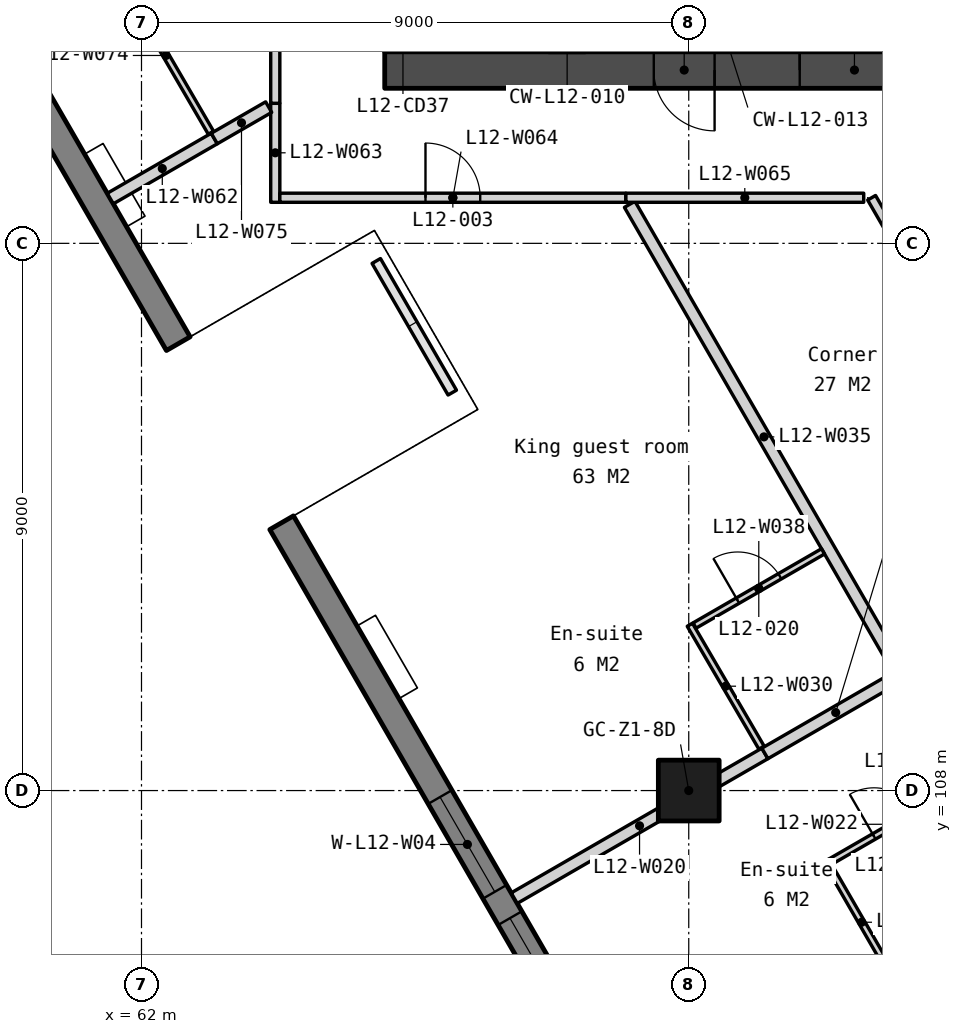
"""IFC4 building model, lengths in metres.
Left out: names, types, materials, properties, quantities, classifications, styles, units other than length and angle.
Written with IfcOpenShell. Run it as: python <this file> out.ifc"""

import sys

from ifc_helpers import new_model, si_unit, direction, frame, frame_2d, origin, origin_2d, place, context, subcontext, project, spatial, polyline, rectangle, outline, extrude, element, fill, save


model = new_model("IFC4")
c1 = context("Model", 3, precision=1e-05, world=origin(), true_north=direction((0.0, 1.0)))
c2 = subcontext(c1, "Body", "Model", "MODEL_VIEW")
j1 = project(units=[si_unit("LENGTHUNIT", "METRE"), si_unit("PLANEANGLEUNIT", "RADIAN")], contexts=[c1])
p1 = place(None, origin())
s1 = spatial("IfcSite", under=j1, at=p1, CompositionType="ELEMENT")
p2 = place(p1, origin())
s2 = spatial("IfcBuilding", under=s1, at=p2, CompositionType="ELEMENT")
p3 = place(p2, frame((0.0, 0.0, 56.0)))
s3 = spatial("IfcBuildingStorey", under=s2, at=p3, CompositionType="ELEMENT", Elevation=56.0)
p4 = place(p3, frame((71.0, 108.0, 0.0), z_axis=(0.0, 0.0, 1.0), x_axis=(1.0, 0.0, 0.0)))
e1 = element("IfcColumn", 1, at=p4, inside=s3, PredefinedType="COLUMN", context=c2, shape_type="SweptSolid", body=[
    extrude(rectangle(XDim=1.0, YDim=1.0, at=origin_2d()), origin(), (0.0, 0.0, 1.0), 3.5),
])
p5 = place(p3, frame((66.0, 119.85, 0.0), z_axis=(0.0, 0.0, 1.0), x_axis=(1.0, 0.0, 0.0)))
e2 = element("IfcWall", 2, at=p5, inside=s3, PredefinedType="SOLIDWALL", context=c2, shape_type="SweptSolid", body=[
    extrude(rectangle(XDim=28.0, YDim=0.6, at=frame_2d((14.0, 0.0))), origin(), (0.0, 0.0, 1.0), 3.35),
])
p6 = place(p5, frame((6.825, 0.0, 0.0)))
e3 = element("IfcOpeningElement", 3, at=p6, cuts=e2, PredefinedType="OPENING", context=c2, shape_type="SweptSolid", body=[
    extrude(rectangle(XDim=1.8, YDim=2.1, at=frame_2d((0.9, 1.05))), frame((0.0, 0.31, 0.0), z_axis=(0.0, -1.0, 0.0), x_axis=(1.0, 0.0, 0.0)), (0.0, 0.0, 1.0), 0.62),
])
p7 = place(p5, frame((15.85, 0.0, 0.0)))
e4 = element("IfcOpeningElement", 4, at=p7, cuts=e2, PredefinedType="OPENING", context=c2, shape_type="SweptSolid", body=[
    extrude(rectangle(XDim=1.5, YDim=2.1, at=frame_2d((0.75, 1.05))), frame((0.0, 0.31, 0.0), z_axis=(0.0, -1.0, 0.0), x_axis=(1.0, 0.0, 0.0)), (0.0, 0.0, 1.0), 0.62),
])
p8 = place(p5, frame((19.375, 0.0, 0.0)))
e5 = element("IfcOpeningElement", 5, at=p8, cuts=e2, PredefinedType="OPENING", context=c2, shape_type="SweptSolid", body=[
    extrude(rectangle(XDim=1.8, YDim=2.1, at=frame_2d((0.9, 1.05))), frame((0.0, 0.31, 0.0), z_axis=(0.0, -1.0, 0.0), x_axis=(1.0, 0.0, 0.0)), (0.0, 0.0, 1.0), 0.62),
])
p9 = place(p5, frame((4.425, 0.0, 0.0)))
e6 = element("IfcOpeningElement", 6, at=p9, cuts=e2, PredefinedType="OPENING", context=c2, shape_type="SweptSolid", body=[
    extrude(rectangle(XDim=1.0, YDim=2.1, at=frame_2d((0.5, 1.05))), frame((0.0, 0.31, 0.0), z_axis=(0.0, -1.0, 0.0), x_axis=(1.0, 0.0, 0.0)), (0.0, 0.0, 1.0), 0.62),
])
p10 = place(p5, frame((9.783, 0.0, 0.0)))
e7 = element("IfcOpeningElement", 7, at=p10, cuts=e2, PredefinedType="OPENING", context=c2, shape_type="SweptSolid", body=[
    extrude(rectangle(XDim=1.0, YDim=2.1, at=frame_2d((0.5, 1.05))), frame((0.0, 0.31, 0.0), z_axis=(0.0, -1.0, 0.0), x_axis=(1.0, 0.0, 0.0)), (0.0, 0.0, 1.0), 0.62),
])
p11 = place(p5, frame((11.525, 0.0, 0.0)))
e8 = element("IfcOpeningElement", 8, at=p11, cuts=e2, PredefinedType="OPENING", context=c2, shape_type="SweptSolid", body=[
    extrude(rectangle(XDim=1.0, YDim=2.1, at=frame_2d((0.5, 1.05))), frame((0.0, 0.31, 0.0), z_axis=(0.0, -1.0, 0.0), x_axis=(1.0, 0.0, 0.0)), (0.0, 0.0, 1.0), 0.62),
])
p12 = place(p5, frame((13.658, 0.0, 0.0)))
e9 = element("IfcOpeningElement", 9, at=p12, cuts=e2, PredefinedType="OPENING", context=c2, shape_type="SweptSolid", body=[
    extrude(rectangle(XDim=1.0, YDim=2.1, at=frame_2d((0.5, 1.05))), frame((0.0, 0.31, 0.0), z_axis=(0.0, -1.0, 0.0), x_axis=(1.0, 0.0, 0.0)), (0.0, 0.0, 1.0), 0.62),
])
p13 = place(p5, frame((21.725, 0.0, 0.0)))
e10 = element("IfcOpeningElement", 10, at=p13, cuts=e2, PredefinedType="OPENING", context=c2, shape_type="SweptSolid", body=[
    extrude(rectangle(XDim=1.0, YDim=2.1, at=frame_2d((0.5, 1.05))), frame((0.0, 0.31, 0.0), z_axis=(0.0, -1.0, 0.0), x_axis=(1.0, 0.0, 0.0)), (0.0, 0.0, 1.0), 0.62),
])
p14 = place(p5, frame((23.425, 0.0, 0.0)))
e11 = element("IfcOpeningElement", 11, at=p14, cuts=e2, PredefinedType="OPENING", context=c2, shape_type="SweptSolid", body=[
    extrude(rectangle(XDim=1.0, YDim=2.1, at=frame_2d((0.5, 1.05))), frame((0.0, 0.31, 0.0), z_axis=(0.0, -1.0, 0.0), x_axis=(1.0, 0.0, 0.0)), (0.0, 0.0, 1.0), 0.62),
])
p15 = place(p3, frame((54.495, 129.397, -0.15), z_axis=(0.0, 0.0, 1.0), x_axis=(0.499995201193, -0.866028174359, 0.0)))
e12 = element("IfcWall", 12, at=p15, inside=s3, PredefinedType="SOLIDWALL", context=c2, shape_type="SweptSolid", body=[
    extrude(outline(polyline([(0.0, 0.0), (0.0, 3.5), (16.22, 3.5), (16.22, 0.0), (0.0, 0.0)])), frame((0.0, 0.225, 0.0), z_axis=(0.0, -1.0, 0.0), x_axis=(1.0, 0.0, 0.0)), (0.0, 0.0, 1.0), 0.45),
])
p16 = place(p15, frame((0.786, 0.0, 1.05)))
e13 = element("IfcOpeningElement", 13, at=p16, cuts=e12, PredefinedType="OPENING", context=c2, shape_type="SweptSolid", body=[
    extrude(rectangle(XDim=1.2, YDim=1.5, at=frame_2d((0.6, 0.75))), frame((0.0, 0.235, 0.0), z_axis=(0.0, -1.0, 0.0), x_axis=(1.0, 0.0, 0.0)), (0.0, 0.0, 1.0), 0.47),
])
p17 = place(p15, frame((6.91, 0.0, 1.05)))
e14 = element("IfcOpeningElement", 14, at=p17, cuts=e12, PredefinedType="OPENING", context=c2, shape_type="SweptSolid", body=[
    extrude(rectangle(XDim=1.8, YDim=1.5, at=frame_2d((0.9, 0.75))), frame((0.0, 0.235, 0.0), z_axis=(0.0, -1.0, 0.0), x_axis=(1.0, 0.0, 0.0)), (0.0, 0.0, 1.0), 0.47),
])
p18 = place(p15, frame((9.21, 0.0, 1.05)))
e15 = element("IfcOpeningElement", 15, at=p18, cuts=e12, PredefinedType="OPENING", context=c2, shape_type="SweptSolid", body=[
    extrude(rectangle(XDim=1.8, YDim=1.5, at=frame_2d((0.9, 0.75))), frame((0.0, 0.235, 0.0), z_axis=(0.0, -1.0, 0.0), x_axis=(1.0, 0.0, 0.0)), (0.0, 0.0, 1.0), 0.47),
])
p19 = place(p3, frame((64.305, 112.405, -0.15), z_axis=(0.0, 0.0, 1.0), x_axis=(0.499997464327, -0.866026867751, 0.0)))
e16 = element("IfcWall", 16, at=p19, inside=s3, PredefinedType="SOLIDWALL", context=c2, shape_type="SweptSolid", body=[
    extrude(outline(polyline([(25.18, 3.5), (25.18, 0.0), (0.0, 0.0), (0.0, 3.5), (25.18, 3.5)])), frame((0.0, 0.225, 0.0), z_axis=(0.0, -1.0, 0.0), x_axis=(1.0, 0.0, 0.0)), (0.0, 0.0, 1.0), 0.45),
])
p20 = place(p19, frame((5.21, 0.0, 1.05)))
e17 = element("IfcOpeningElement", 17, at=p20, cuts=e16, PredefinedType="OPENING", context=c2, shape_type="SweptSolid", body=[
    extrude(rectangle(XDim=1.8, YDim=1.5, at=frame_2d((0.9, 0.75))), frame((0.0, 0.235, 0.0), z_axis=(0.0, -1.0, 0.0), x_axis=(1.0, 0.0, 0.0)), (0.0, 0.0, 1.0), 0.47),
])
p21 = place(p19, frame((7.51, 0.0, 1.05)))
e18 = element("IfcOpeningElement", 18, at=p21, cuts=e16, PredefinedType="OPENING", context=c2, shape_type="SweptSolid", body=[
    extrude(rectangle(XDim=1.8, YDim=1.5, at=frame_2d((0.9, 0.75))), frame((0.0, 0.235, 0.0), z_axis=(0.0, -1.0, 0.0), x_axis=(1.0, 0.0, 0.0)), (0.0, 0.0, 1.0), 0.47),
])
p22 = place(p19, frame((14.17, 0.0, 1.05)))
e19 = element("IfcOpeningElement", 19, at=p22, cuts=e16, PredefinedType="OPENING", context=c2, shape_type="SweptSolid", body=[
    extrude(rectangle(XDim=1.8, YDim=1.5, at=frame_2d((0.9, 0.75))), frame((0.0, 0.235, 0.0), z_axis=(0.0, -1.0, 0.0), x_axis=(1.0, 0.0, 0.0)), (0.0, 0.0, 1.0), 0.47),
])
p23 = place(p19, frame((16.47, 0.0, 1.05)))
e20 = element("IfcOpeningElement", 20, at=p23, cuts=e16, PredefinedType="OPENING", context=c2, shape_type="SweptSolid", body=[
    extrude(rectangle(XDim=1.8, YDim=1.5, at=frame_2d((0.9, 0.75))), frame((0.0, 0.235, 0.0), z_axis=(0.0, -1.0, 0.0), x_axis=(1.0, 0.0, 0.0)), (0.0, 0.0, 1.0), 0.47),
])
p24 = place(p19, frame((23.194, 0.0, 1.05)))
e21 = element("IfcOpeningElement", 21, at=p24, cuts=e16, PredefinedType="OPENING", context=c2, shape_type="SweptSolid", body=[
    extrude(rectangle(XDim=1.2, YDim=1.5, at=frame_2d((0.6, 0.75))), frame((0.0, 0.235, 0.0), z_axis=(0.0, -1.0, 0.0), x_axis=(1.0, 0.0, 0.0)), (0.0, 0.0, 1.0), 0.47),
])
p25 = place(p2, frame((0.0, 0.0, 52.5)))
s4 = spatial("IfcBuildingStorey", under=s2, at=p25, CompositionType="ELEMENT", Elevation=52.5)
for number, where, z_axis, x_axis in (
    (22, (62.522, 115.042, 0.0), (0.0, 0.0, 1.0), (0.866, 0.5, 0.0)),
    (23, (63.998, 112.488, 0.0), (0.0, 0.0, 1.0), (0.866, 0.5, 0.0)),
):
    element("IfcWall", number, at=place(p25, frame(where, z_axis=z_axis, x_axis=x_axis)), inside=s4, PredefinedType="SOLIDWALL", context=c2, shape_type="SweptSolid", body=[
        extrude(rectangle(XDim=3.95, YDim=0.45, at=frame_2d((1.975, 0.0))), origin(), (0.0, 0.0, 1.0), 6.85),
    ])
p26 = place(p3, frame((73.258, 106.847, 0.0), z_axis=(0.0, 0.0, 1.0), x_axis=(0.499999433879, -0.866025730634, 0.0)))
e24 = element("IfcWall", 24, at=p26, inside=s3, PredefinedType="PARTITIONING", context=c2, shape_type="SweptSolid", body=[
    extrude(rectangle(XDim=2.34, YDim=0.1, at=frame_2d((1.17, 0.0))), origin(), (0.0, 0.0, 1.0), 3.35),
])
p27 = place(p3, frame((68.13, 106.23, 0.0), z_axis=(0.0, 0.0, 1.0), x_axis=(0.866037825118, 0.499978485002, 0.0)))
e25 = element("IfcWall", 25, at=p27, inside=s3, PredefinedType="PARTITIONING", context=c2, shape_type="SweptSolid", body=[
    extrude(rectangle(XDim=4.76, YDim=0.2, at=frame_2d((2.38, 0.0))), origin(), (0.0, 0.0, 1.0), 3.35),
])
p28 = place(p3, frame((73.327, 106.829, 0.0), z_axis=(0.0, 0.0, 1.0), x_axis=(0.866040446274, 0.499973944738, 0.0)))
e26 = element("IfcWall", 26, at=p28, inside=s3, PredefinedType="PARTITIONING", context=c2, shape_type="SweptSolid", body=[
    extrude(rectangle(XDim=2.465, YDim=0.1, at=frame_2d((1.232, 0.0))), origin(), (0.0, 0.0, 1.0), 3.35),
])
p29 = place(p28, frame((0.833, 0.0, 0.0)))
e27 = element("IfcOpeningElement", 27, at=p29, cuts=e26, PredefinedType="OPENING", context=c2, shape_type="SweptSolid", body=[
    extrude(rectangle(XDim=0.8, YDim=2.1, at=frame_2d((0.4, 1.05))), frame((0.0, 0.06, 0.0), z_axis=(0.0, -1.0, 0.0), x_axis=(1.0, 0.0, 0.0)), (0.0, 0.0, 1.0), 0.12),
])
p30 = place(p3, frame((71.018, 110.727, 0.0), z_axis=(0.0, 0.0, 1.0), x_axis=(0.503637463939, -0.863915102841, 0.0)))
e28 = element("IfcWall", 28, at=p30, inside=s3, PredefinedType="PARTITIONING", context=c2, shape_type="SweptSolid", body=[
    extrude(rectangle(XDim=2.34, YDim=0.1, at=frame_2d((1.17, 0.0))), origin(), (0.0, 0.0, 1.0), 3.35),
])
p31 = place(p3, frame((72.252, 108.61, 0.0), z_axis=(0.0, 0.0, 1.0), x_axis=(0.865989100438, 0.500062873969, 0.0)))
e29 = element("IfcWall", 29, at=p31, inside=s3, PredefinedType="PARTITIONING", context=c2, shape_type="SweptSolid", body=[
    extrude(rectangle(XDim=2.69, YDim=0.2, at=frame_2d((1.345, 0.0))), origin(), (0.0, 0.0, 1.0), 3.35),
])
p32 = place(p3, frame((70.029, 117.642, 0.0), z_axis=(0.0, 0.0, 1.0), x_axis=(0.499997595687, -0.866026791911, 0.0)))
e30 = element("IfcWall", 30, at=p32, inside=s3, PredefinedType="PARTITIONING", context=c2, shape_type="SweptSolid", body=[
    extrude(rectangle(XDim=8.833, YDim=0.2, at=frame_2d((4.417, 0.0))), origin(), (0.0, 0.0, 1.0), 3.35),
])
p33 = place(p3, frame((71.095, 110.714, 0.0), z_axis=(0.0, 0.0, 1.0), x_axis=(0.866048967903, 0.499959183527, 0.0)))
e31 = element("IfcWall", 31, at=p33, inside=s3, PredefinedType="PARTITIONING", context=c2, shape_type="SweptSolid", body=[
    extrude(rectangle(XDim=2.44, YDim=0.1, at=frame_2d((1.22, 0.0))), origin(), (0.0, 0.0, 1.0), 3.35),
])
p34 = place(p33, frame((0.82, 0.0, 0.0)))
e32 = element("IfcOpeningElement", 32, at=p34, cuts=e31, PredefinedType="OPENING", context=c2, shape_type="SweptSolid", body=[
    extrude(rectangle(XDim=0.8, YDim=2.1, at=frame_2d((0.4, 1.05))), frame((0.0, 0.06, 0.0), z_axis=(0.0, -1.0, 0.0), x_axis=(1.0, 0.0, 0.0)), (0.0, 0.0, 1.0), 0.12),
])
p35 = place(p3, frame((74.007, 117.75, 0.0), z_axis=(0.0, 0.0, 1.0), x_axis=(0.500026110575, -0.866010328312, 0.0)))
e33 = element("IfcWall", 33, at=p35, inside=s3, PredefinedType="PARTITIONING", context=c2, shape_type="SweptSolid", body=[
    extrude(rectangle(XDim=7.052, YDim=0.15, at=frame_2d((3.526, 0.0))), origin(), (0.0, 0.0, 1.0), 3.35),
])
p36 = place(p35, frame((3.026, 0.0, 0.0)))
e34 = element("IfcOpeningElement", 34, at=p36, cuts=e33, PredefinedType="OPENING", context=c2, shape_type="SweptSolid", body=[
    extrude(rectangle(XDim=1.0, YDim=2.1, at=frame_2d((0.5, 1.05))), frame((0.0, 0.085, 0.0), z_axis=(0.0, -1.0, 0.0), x_axis=(1.0, 0.0, 0.0)), (0.0, 0.0, 1.0), 0.17),
])
p37 = place(p3, frame((61.487, 117.737, 0.0), z_axis=(0.0, 0.0, 1.0), x_axis=(0.866051805705, 0.499954267743, 0.0)))
e35 = element("IfcWall", 35, at=p37, inside=s3, PredefinedType="PARTITIONING", context=c2, shape_type="SweptSolid", body=[
    extrude(rectangle(XDim=1.975, YDim=0.2, at=frame_2d((0.988, 0.0))), origin(), (0.0, 0.0, 1.0), 3.35),
])
p38 = place(p3, frame((64.2, 117.675, 0.0), z_axis=(0.0, 0.0, 1.0), x_axis=(0.0, 1.0, 0.0)))
e36 = element("IfcWall", 36, at=p38, inside=s3, PredefinedType="PARTITIONING", context=c2, shape_type="SweptSolid", body=[
    extrude(rectangle(XDim=1.628, YDim=0.15, at=frame_2d((0.814, 0.0))), origin(), (0.0, 0.0, 1.0), 3.35),
])
p39 = place(p3, frame((64.275, 117.75, 0.0), z_axis=(0.0, 0.0, 1.0), x_axis=(1.0, 0.0, 0.0)))
e37 = element("IfcWall", 37, at=p39, inside=s3, PredefinedType="PARTITIONING", context=c2, shape_type="SweptSolid", body=[
    extrude(rectangle(XDim=5.691, YDim=0.15, at=frame_2d((2.846, 0.0))), origin(), (0.0, 0.0, 1.0), 3.35),
])
p40 = place(p39, frame((2.396, 0.0, 0.0)))
e38 = element("IfcOpeningElement", 38, at=p40, cuts=e37, PredefinedType="OPENING", context=c2, shape_type="SweptSolid", body=[
    extrude(rectangle(XDim=0.9, YDim=2.1, at=frame_2d((0.45, 1.05))), frame((0.0, 0.085, 0.0), z_axis=(0.0, -1.0, 0.0), x_axis=(1.0, 0.0, 0.0)), (0.0, 0.0, 1.0), 0.17),
])
p41 = place(p3, frame((69.966, 117.75, 0.0), z_axis=(0.0, 0.0, 1.0), x_axis=(1.0, 0.0, 0.0)))
e39 = element("IfcWall", 39, at=p41, inside=s3, PredefinedType="PARTITIONING", context=c2, shape_type="SweptSolid", body=[
    extrude(rectangle(XDim=3.911, YDim=0.15, at=frame_2d((1.956, 0.0))), origin(), (0.0, 0.0, 1.0), 3.35),
])
p42 = place(p3, frame((61.663, 121.361, 0.0), z_axis=(0.0, 0.0, 1.0), x_axis=(0.502884554521, -0.864353587847, 0.0)))
e40 = element("IfcWall", 40, at=p42, inside=s3, PredefinedType="PARTITIONING", context=c2, shape_type="SweptSolid", body=[
    extrude(rectangle(XDim=2.94, YDim=0.1, at=frame_2d((1.47, 0.0))), origin(), (0.0, 0.0, 1.0), 3.35),
])
p43 = place(p42, frame((0.15, 0.0, 0.0)))
e41 = element("IfcOpeningElement", 41, at=p43, cuts=e40, PredefinedType="OPENING", context=c2, shape_type="SweptSolid", body=[
    extrude(rectangle(XDim=0.8, YDim=2.1, at=frame_2d((0.4, 1.05))), frame((0.0, 0.06, 0.0), z_axis=(0.0, -1.0, 0.0), x_axis=(1.0, 0.0, 0.0)), (0.0, 0.0, 1.0), 0.12),
])
p44 = place(p3, frame((63.197, 118.724, 0.0), z_axis=(0.0, 0.0, 1.0), x_axis=(0.86596515875, 0.500104332946, 0.0)))
e42 = element("IfcWall", 42, at=p44, inside=s3, PredefinedType="PARTITIONING", context=c2, shape_type="SweptSolid", body=[
    extrude(rectangle(XDim=1.033, YDim=0.2, at=frame_2d((0.517, 0.0))), origin(), (0.0, 0.0, 1.0), 3.35),
])
p45 = place(p3, frame((64.2, 119.303, 0.0), z_axis=(0.0, 0.0, 1.0), x_axis=(0.0, 1.0, 0.0)))
e43 = element("IfcWall", 43, at=p45, inside=s3, PredefinedType="PARTITIONING", context=c2, shape_type="SweptSolid", body=[
    extrude(rectangle(XDim=3.464, YDim=0.15, at=frame_2d((1.732, 0.0))), origin(), (0.0, 0.0, 1.0), 3.35),
])
p46 = place(p6, origin())
e44 = element("IfcDoor", 44, at=p46, inside=s3, OperationType="DOUBLE_DOOR_DOUBLE_SWING", PredefinedType="DOOR", context=c2, shape_type="SweptSolid", body=[
    extrude(rectangle(XDim=1.8, YDim=2.1, at=frame_2d((0.9, 1.05))), frame((0.0, 0.025, 0.0), z_axis=(0.0, -1.0, 0.0), x_axis=(1.0, 0.0, 0.0)), (0.0, 0.0, 1.0), 0.05),
])
fill(e3, e44)
p47 = place(p9, origin())
e45 = element("IfcDoor", 45, at=p47, inside=s3, OperationType="SINGLE_SWING_RIGHT", PredefinedType="DOOR", context=c2, shape_type="SweptSolid", body=[
    extrude(rectangle(XDim=1.0, YDim=2.1, at=frame_2d((0.5, 1.05))), frame((0.0, 0.025, 0.0), z_axis=(0.0, -1.0, 0.0), x_axis=(1.0, 0.0, 0.0)), (0.0, 0.0, 1.0), 0.05),
])
fill(e6, e45)
p48 = place(p20, origin())
e46 = element("IfcWindow", 46, at=p48, inside=s3, PartitioningType="SINGLE_PANEL", PredefinedType="WINDOW", context=c2, shape_type="SweptSolid", body=[
    extrude(rectangle(XDim=1.8, YDim=1.5, at=frame_2d((0.9, 0.75))), frame((0.0, 0.03, 0.0), z_axis=(0.0, -1.0, 0.0), x_axis=(1.0, 0.0, 0.0)), (0.0, 0.0, 1.0), 0.06),
])
fill(e17, e46)
p49 = place(p21, origin())
e47 = element("IfcWindow", 47, at=p49, inside=s3, PartitioningType="SINGLE_PANEL", PredefinedType="WINDOW", context=c2, shape_type="SweptSolid", body=[
    extrude(rectangle(XDim=1.8, YDim=1.5, at=frame_2d((0.9, 0.75))), frame((0.0, 0.03, 0.0), z_axis=(0.0, -1.0, 0.0), x_axis=(1.0, 0.0, 0.0)), (0.0, 0.0, 1.0), 0.06),
])
fill(e18, e47)
p50 = place(p40, origin())
e48 = element("IfcDoor", 48, at=p50, inside=s3, OperationType="SINGLE_SWING_LEFT", PredefinedType="DOOR", context=c2, shape_type="SweptSolid", body=[
    extrude(rectangle(XDim=0.9, YDim=2.1, at=frame_2d((0.45, 1.05))), frame((0.0, 0.025, 0.0), z_axis=(0.0, -1.0, 0.0), x_axis=(1.0, 0.0, 0.0)), (0.0, 0.0, 1.0), 0.05),
])
fill(e38, e48)
p51 = place(p34, origin())
e49 = element("IfcDoor", 49, at=p51, inside=s3, OperationType="SINGLE_SWING_LEFT", PredefinedType="DOOR", context=c2, shape_type="SweptSolid", body=[
    extrude(rectangle(XDim=0.8, YDim=2.1, at=frame_2d((0.4, 1.05))), frame((0.0, 0.025, 0.0), z_axis=(0.0, -1.0, 0.0), x_axis=(1.0, 0.0, 0.0)), (0.0, 0.0, 1.0), 0.05),
])
fill(e32, e49)
p52 = place(p29, origin())
e50 = element("IfcDoor", 50, at=p52, inside=s3, OperationType="SINGLE_SWING_LEFT", PredefinedType="DOOR", context=c2, shape_type="SweptSolid", body=[
    extrude(rectangle(XDim=0.8, YDim=2.1, at=frame_2d((0.4, 1.05))), frame((0.0, 0.025, 0.0), z_axis=(0.0, -1.0, 0.0), x_axis=(1.0, 0.0, 0.0)), (0.0, 0.0, 1.0), 0.05),
])
fill(e27, e50)
save(model, sys.argv[1])
